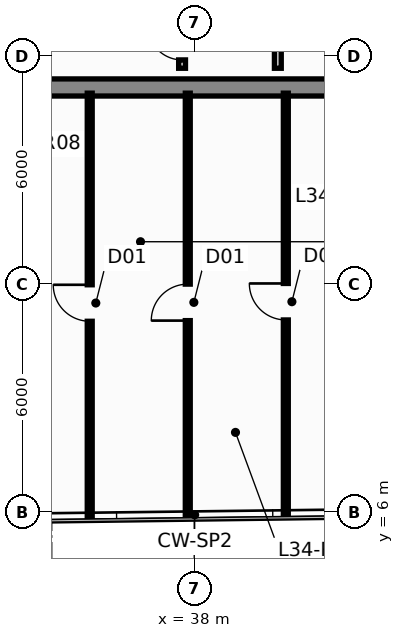
"""IFC4 building model, lengths in metres.
Left out: names, types, materials, properties, quantities, classifications, styles, units other than length and angle.
Written with IfcOpenShell. Run it as: python <this file> out.ifc"""

import sys

from ifc_helpers import new_model, si_unit, direction, frame, frame_2d, origin, place, context, subcontext, project, spatial, rectangle, extrude, element, fill, save


model = new_model("IFC4")
c1 = context("Model", 3, precision=1e-05, world=origin(), true_north=direction((0.0, 1.0)))
c2 = subcontext(c1, "Body", "Model", "MODEL_VIEW")
j1 = project(units=[si_unit("LENGTHUNIT", "METRE"), si_unit("PLANEANGLEUNIT", "RADIAN")], contexts=[c1])
p1 = place(None, origin())
s1 = spatial("IfcSite", under=j1, at=p1, CompositionType="ELEMENT")
p2 = place(p1, origin())
s2 = spatial("IfcBuilding", under=s1, at=p2, CompositionType="ELEMENT")
p3 = place(p2, frame((0.0, 0.0, 131.8)))
s3 = spatial("IfcBuildingStorey", under=s2, at=p3, CompositionType="ELEMENT", Elevation=131.8)
p4 = place(p3, frame((33.96, 17.175, 0.0), z_axis=(0.0, 0.0, 1.0), x_axis=(1.0, 0.0, 0.0)))
e1 = element("IfcWall", 1, at=p4, inside=s3, PredefinedType="SHEAR", context=c2, shape_type="SweptSolid", body=[
    extrude(rectangle(XDim=8.08, YDim=0.45, at=frame_2d((4.04, 0.0))), origin(), (0.0, 0.0, 1.0), 3.65),
])
p5 = place(p3, frame((37.68, 17.68, 0.0), z_axis=(0.0, 0.0, 1.0), x_axis=(0.0, 1.0, 0.0)))
e2 = element("IfcWall", 2, at=p5, inside=s3, PredefinedType="PARTITIONING", context=c2, shape_type="SweptSolid", body=[
    extrude(rectangle(XDim=2.7, YDim=0.18, at=frame_2d((1.35, 0.0))), origin(), (0.0, 0.0, 1.0), 3.4),
])
p6 = place(p5, frame((0.22, 0.0, 0.0)))
e3 = element("IfcOpeningElement", 3, at=p6, cuts=e2, PredefinedType="OPENING", context=c2, shape_type="SweptSolid", body=[
    extrude(rectangle(XDim=0.9, YDim=2.1, at=frame_2d((0.45, 1.05))), frame((0.0, 0.102, 0.0), z_axis=(0.0, -1.0, 0.0), x_axis=(1.0, 0.0, 0.0)), (0.0, 0.0, 1.0), 0.204),
])
p7 = place(p5, frame((1.54, 0.0, 0.0)))
e4 = element("IfcOpeningElement", 4, at=p7, cuts=e2, PredefinedType="OPENING", context=c2, shape_type="SweptSolid", body=[
    extrude(rectangle(XDim=0.9, YDim=2.1, at=frame_2d((0.45, 1.05))), frame((0.0, 0.102, 0.0), z_axis=(0.0, -1.0, 0.0), x_axis=(1.0, 0.0, 0.0)), (0.0, 0.0, 1.0), 0.204),
])
p8 = place(p3, frame((40.2, 17.68, 0.0), z_axis=(0.0, 0.0, 1.0), x_axis=(0.0, 1.0, 0.0)))
e5 = element("IfcWall", 5, at=p8, inside=s3, PredefinedType="PARTITIONING", context=c2, shape_type="SweptSolid", body=[
    extrude(rectangle(XDim=2.7, YDim=0.18, at=frame_2d((1.35, 0.0))), origin(), (0.0, 0.0, 1.0), 3.4),
])
p9 = place(p8, frame((0.85, 0.0, 0.0)))
e6 = element("IfcOpeningElement", 6, at=p9, cuts=e5, PredefinedType="OPENING", context=c2, shape_type="SweptSolid", body=[
    extrude(rectangle(XDim=0.9, YDim=2.1, at=frame_2d((0.45, 1.05))), frame((0.0, 0.102, 0.0), z_axis=(0.0, -1.0, 0.0), x_axis=(1.0, 0.0, 0.0)), (0.0, 0.0, 1.0), 0.204),
])
p10 = place(p3, frame((35.25, 5.891, 0.0), z_axis=(0.0, 0.0, 1.0), x_axis=(0.0, 1.0, 0.0)))
e7 = element("IfcWall", 7, at=p10, inside=s3, PredefinedType="PARTITIONING", context=c2, shape_type="SweptSolid", body=[
    extrude(rectangle(XDim=11.134, YDim=0.13, at=frame_2d((5.567, 0.0))), origin(), (0.0, 0.0, 1.0), 3.4),
])
p11 = place(p10, frame((5.132, 0.0, 0.0)))
e8 = element("IfcOpeningElement", 8, at=p11, cuts=e7, PredefinedType="OPENING", context=c2, shape_type="SweptSolid", body=[
    extrude(rectangle(XDim=0.96, YDim=2.15, at=frame_2d((0.48, 1.075))), frame((0.0, 0.077, 0.0), z_axis=(0.0, -1.0, 0.0), x_axis=(1.0, 0.0, 0.0)), (0.0, 0.0, 1.0), 0.154),
])
p12 = place(p3, frame((37.83, 5.924, 0.0), z_axis=(0.0, 0.0, 1.0), x_axis=(0.0, 1.0, 0.0)))
e9 = element("IfcWall", 9, at=p12, inside=s3, PredefinedType="PARTITIONING", context=c2, shape_type="SweptSolid", body=[
    extrude(rectangle(XDim=11.101, YDim=0.13, at=frame_2d((5.551, 0.0))), origin(), (0.0, 0.0, 1.0), 3.4),
])
p13 = place(p12, frame((5.117, 0.0, 0.0)))
e10 = element("IfcOpeningElement", 10, at=p13, cuts=e9, PredefinedType="OPENING", context=c2, shape_type="SweptSolid", body=[
    extrude(rectangle(XDim=0.96, YDim=2.15, at=frame_2d((0.48, 1.075))), frame((0.0, 0.077, 0.0), z_axis=(0.0, -1.0, 0.0), x_axis=(1.0, 0.0, 0.0)), (0.0, 0.0, 1.0), 0.154),
])
p14 = place(p3, frame((40.41, 5.956, 0.0), z_axis=(0.0, 0.0, 1.0), x_axis=(0.0, 1.0, 0.0)))
e11 = element("IfcWall", 11, at=p14, inside=s3, PredefinedType="PARTITIONING", context=c2, shape_type="SweptSolid", body=[
    extrude(rectangle(XDim=11.069, YDim=0.13, at=frame_2d((5.534, 0.0))), origin(), (0.0, 0.0, 1.0), 3.4),
])
p15 = place(p14, frame((5.102, 0.0, 0.0)))
e12 = element("IfcOpeningElement", 12, at=p15, cuts=e11, PredefinedType="OPENING", context=c2, shape_type="SweptSolid", body=[
    extrude(rectangle(XDim=0.96, YDim=2.15, at=frame_2d((0.48, 1.075))), frame((0.0, 0.077, 0.0), z_axis=(0.0, -1.0, 0.0), x_axis=(1.0, 0.0, 0.0)), (0.0, 0.0, 1.0), 0.154),
])
p16 = place(p6, origin())
e13 = element("IfcDoor", 13, at=p16, inside=s3, OperationType="SINGLE_SWING_RIGHT", PredefinedType="DOOR", context=c2, shape_type="SweptSolid", body=[
    extrude(rectangle(XDim=0.9, YDim=2.1, at=frame_2d((0.45, 1.05))), frame((0.0, 0.025, 0.0), z_axis=(0.0, -1.0, 0.0), x_axis=(1.0, 0.0, 0.0)), (0.0, 0.0, 1.0), 0.05),
])
fill(e3, e13)
p17 = place(p11, origin())
e14 = element("IfcDoor", 14, at=p17, inside=s3, OperationType="SINGLE_SWING_RIGHT", PredefinedType="DOOR", context=c2, shape_type="SweptSolid", body=[
    extrude(rectangle(XDim=0.96, YDim=2.15, at=frame_2d((0.48, 1.075))), frame((0.0, 0.025, 0.0), z_axis=(0.0, -1.0, 0.0), x_axis=(1.0, 0.0, 0.0)), (0.0, 0.0, 1.0), 0.05),
])
fill(e8, e14)
p18 = place(p13, origin())
e15 = element("IfcDoor", 15, at=p18, inside=s3, OperationType="SINGLE_SWING_LEFT", PredefinedType="DOOR", context=c2, shape_type="SweptSolid", body=[
    extrude(rectangle(XDim=0.96, YDim=2.15, at=frame_2d((0.48, 1.075))), frame((0.0, 0.025, 0.0), z_axis=(0.0, -1.0, 0.0), x_axis=(1.0, 0.0, 0.0)), (0.0, 0.0, 1.0), 0.05),
])
fill(e10, e15)
p19 = place(p15, origin())
e16 = element("IfcDoor", 16, at=p19, inside=s3, OperationType="SINGLE_SWING_RIGHT", PredefinedType="DOOR", context=c2, shape_type="SweptSolid", body=[
    extrude(rectangle(XDim=0.96, YDim=2.15, at=frame_2d((0.48, 1.075))), frame((0.0, 0.025, 0.0), z_axis=(0.0, -1.0, 0.0), x_axis=(1.0, 0.0, 0.0)), (0.0, 0.0, 1.0), 0.05),
])
fill(e12, e16)
save(model, sys.argv[1])
